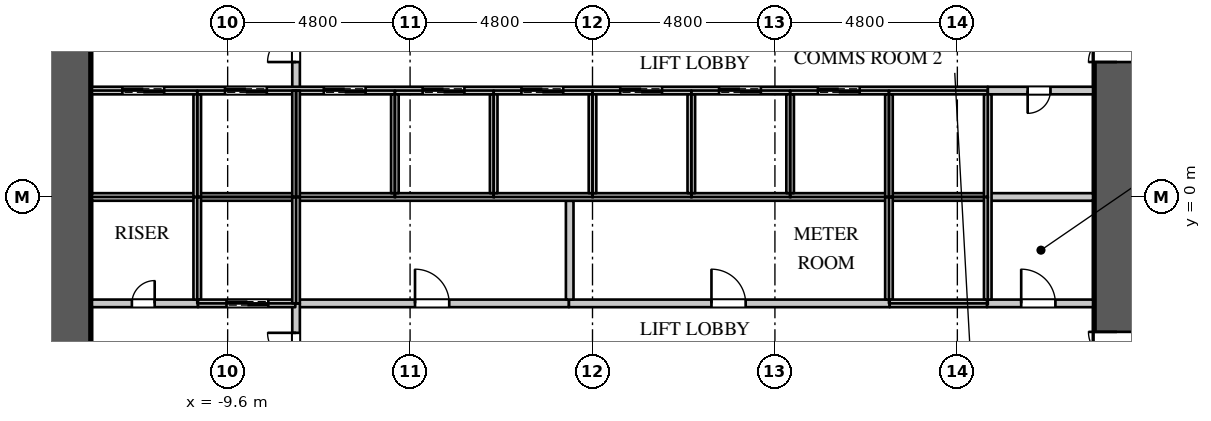
"""IFC4 building model, lengths in metres.
Left out: names, types, materials, properties, quantities, classifications, styles, units other than length and angle.
Written with IfcOpenShell. Run it as: python <this file> out.ifc"""

import sys

from ifc_helpers import new_model, si_unit, direction, frame, frame_2d, origin, place, context, subcontext, project, spatial, rectangle, extrude, element, fill, save


model = new_model("IFC4")
c1 = context("Model", 3, precision=1e-05, world=origin(), true_north=direction((0.0, 1.0)))
c2 = subcontext(c1, "Body", "Model", "MODEL_VIEW")
j1 = project(units=[si_unit("LENGTHUNIT", "METRE"), si_unit("PLANEANGLEUNIT", "RADIAN")], contexts=[c1])
p1 = place(None, origin())
s1 = spatial("IfcSite", under=j1, at=p1, CompositionType="ELEMENT")
p2 = place(p1, origin())
s2 = spatial("IfcBuilding", under=s1, at=p2, CompositionType="ELEMENT")
p3 = place(p2, frame((0.0, 0.0, 11.0)))
s3 = spatial("IfcBuildingStorey", under=s2, at=p3, CompositionType="ELEMENT", Elevation=11.0)
p4 = place(p3, frame((13.8, -10.8, 0.0), z_axis=(0.0, 0.0, 1.0), x_axis=(0.0, 1.0, 0.0)))
e1 = element("IfcWall", 1, at=p4, inside=s3, PredefinedType="SHEAR", context=c2, shape_type="SweptSolid", body=[
    extrude(rectangle(XDim=21.6, YDim=1.2, at=frame_2d((10.8, 0.0))), origin(), (0.0, 0.0, 1.0), 5.0),
])
p5 = place(p4, frame((14.35, 0.0, 0.0)))
e2 = element("IfcOpeningElement", 2, at=p5, cuts=e1, PredefinedType="OPENING", context=c2, shape_type="SweptSolid", body=[
    extrude(rectangle(XDim=1.5, YDim=2.4, at=frame_2d((0.75, 1.2))), frame((0.0, 0.61, 0.0), z_axis=(0.0, -1.0, 0.0), x_axis=(1.0, 0.0, 0.0)), (0.0, 0.0, 1.0), 1.22),
])
p6 = place(p4, frame((5.75, 0.0, 0.0)))
e3 = element("IfcOpeningElement", 3, at=p6, cuts=e1, PredefinedType="OPENING", context=c2, shape_type="SweptSolid", body=[
    extrude(rectangle(XDim=1.5, YDim=2.4, at=frame_2d((0.75, 1.2))), frame((0.0, 0.61, 0.0), z_axis=(0.0, -1.0, 0.0), x_axis=(1.0, 0.0, 0.0)), (0.0, 0.0, 1.0), 1.22),
])
p7 = place(p3, frame((-13.8, -10.8, 0.0), z_axis=(0.0, 0.0, 1.0), x_axis=(0.0, 1.0, 0.0)))
e4 = element("IfcWall", 4, at=p7, inside=s3, PredefinedType="SHEAR", context=c2, shape_type="SweptSolid", body=[
    extrude(rectangle(XDim=21.6, YDim=1.2, at=frame_2d((10.8, 0.0))), origin(), (0.0, 0.0, 1.0), 5.0),
])
p8 = place(p7, frame((15.5, 0.0, 0.0)))
e5 = element("IfcOpeningElement", 5, at=p8, cuts=e4, PredefinedType="OPENING", context=c2, shape_type="SweptSolid", body=[
    extrude(rectangle(XDim=1.5, YDim=2.4, at=frame_2d((0.75, 1.2))), frame((0.0, 0.61, 0.0), z_axis=(0.0, -1.0, 0.0), x_axis=(1.0, 0.0, 0.0)), (0.0, 0.0, 1.0), 1.22),
])
p9 = place(p7, frame((4.5, 0.0, 0.0)))
e6 = element("IfcOpeningElement", 6, at=p9, cuts=e4, PredefinedType="OPENING", context=c2, shape_type="SweptSolid", body=[
    extrude(rectangle(XDim=1.5, YDim=2.4, at=frame_2d((0.75, 1.2))), frame((0.0, 0.61, 0.0), z_axis=(0.0, -1.0, 0.0), x_axis=(1.0, 0.0, 0.0)), (0.0, 0.0, 1.0), 1.22),
])
p10 = place(p3, frame((-7.82, -2.8, 0.0), z_axis=(0.0, 0.0, 1.0), x_axis=(1.0, 0.0, 0.0)))
e7 = element("IfcWall", 7, at=p10, inside=s3, PredefinedType="PARTITIONING", context=c2, shape_type="SweptSolid", body=[
    extrude(rectangle(XDim=7.2, YDim=0.2, at=frame_2d((3.6, 0.0))), origin(), (0.0, 0.0, 1.0), 4.65),
])
p11 = place(p10, frame((3.15, 0.0, 0.0)))
e8 = element("IfcOpeningElement", 8, at=p11, cuts=e7, PredefinedType="OPENING", context=c2, shape_type="SweptSolid", body=[
    extrude(rectangle(XDim=0.9, YDim=2.2, at=frame_2d((0.45, 1.1))), frame((0.0, 0.11, 0.0), z_axis=(0.0, -1.0, 0.0), x_axis=(1.0, 0.0, 0.0)), (0.0, 0.0, 1.0), 0.22),
])
p12 = place(p3, frame((-7.8, -8.075, 0.0), z_axis=(0.0, 0.0, 1.0), x_axis=(0.0, 1.0, 0.0)))
e9 = element("IfcWall", 9, at=p12, inside=s3, PredefinedType="PARTITIONING", context=c2, shape_type="SweptSolid", body=[
    extrude(rectangle(XDim=5.275, YDim=0.2, at=frame_2d((2.637, 0.0))), origin(), (0.0, 0.0, 1.0), 4.65),
])
p13 = place(p12, frame((3.0, 0.0, 0.0)))
e10 = element("IfcOpeningElement", 10, at=p13, cuts=e9, PredefinedType="OPENING", context=c2, shape_type="SweptSolid", body=[
    extrude(rectangle(XDim=1.5, YDim=2.4, at=frame_2d((0.75, 1.2))), frame((0.0, 0.11, 0.0), z_axis=(0.0, -1.0, 0.0), x_axis=(1.0, 0.0, 0.0)), (0.0, 0.0, 1.0), 0.22),
])
p14 = place(p3, frame((-7.8, 2.8, 0.0), z_axis=(0.0, 0.0, 1.0), x_axis=(0.0, 1.0, 0.0)))
e11 = element("IfcWall", 11, at=p14, inside=s3, PredefinedType="PARTITIONING", context=c2, shape_type="SweptSolid", body=[
    extrude(rectangle(XDim=5.275, YDim=0.2, at=frame_2d((2.637, 0.0))), origin(), (0.0, 0.0, 1.0), 4.65),
])
p15 = place(p14, frame((0.75, 0.0, 0.0)))
e12 = element("IfcOpeningElement", 12, at=p15, cuts=e11, PredefinedType="OPENING", context=c2, shape_type="SweptSolid", body=[
    extrude(rectangle(XDim=1.5, YDim=2.4, at=frame_2d((0.75, 1.2))), frame((0.0, 0.11, 0.0), z_axis=(0.0, -1.0, 0.0), x_axis=(1.0, 0.0, 0.0)), (0.0, 0.0, 1.0), 0.22),
])
p16 = place(p3, frame((-13.17, -2.8, 0.0), z_axis=(0.0, 0.0, 1.0), x_axis=(1.0, 0.0, 0.0)))
e13 = element("IfcWall", 13, at=p16, inside=s3, PredefinedType="PARTITIONING", context=c2, shape_type="SweptSolid", body=[
    extrude(rectangle(XDim=2.79, YDim=0.2, at=frame_2d((1.395, 0.0))), origin(), (0.0, 0.0, 1.0), 4.65),
])
p17 = place(p16, frame((1.05, 0.0, 0.0)))
e14 = element("IfcOpeningElement", 14, at=p17, cuts=e13, PredefinedType="OPENING", context=c2, shape_type="SweptSolid", body=[
    extrude(rectangle(XDim=0.6, YDim=2.0, at=frame_2d((0.3, 1.0))), frame((0.0, 0.11, 0.0), z_axis=(0.0, -1.0, 0.0), x_axis=(1.0, 0.0, 0.0)), (0.0, 0.0, 1.0), 0.22),
])
p18 = place(p3, frame((-0.62, -2.8, 0.0), z_axis=(0.0, 0.0, 1.0), x_axis=(1.0, 0.0, 0.0)))
e15 = element("IfcWall", 15, at=p18, inside=s3, PredefinedType="PARTITIONING", context=c2, shape_type="SweptSolid", body=[
    extrude(rectangle(XDim=8.44, YDim=0.2, at=frame_2d((4.22, 0.0))), origin(), (0.0, 0.0, 1.0), 4.65),
])
p19 = place(p18, frame((3.75, 0.0, 0.0)))
e16 = element("IfcOpeningElement", 16, at=p19, cuts=e15, PredefinedType="OPENING", context=c2, shape_type="SweptSolid", body=[
    extrude(rectangle(XDim=0.9, YDim=2.2, at=frame_2d((0.45, 1.1))), frame((0.0, 0.11, 0.0), z_axis=(0.0, -1.0, 0.0), x_axis=(1.0, 0.0, 0.0)), (0.0, 0.0, 1.0), 0.22),
])
p20 = place(p3, frame((-0.6, -2.7, 0.0), z_axis=(0.0, 0.0, 1.0), x_axis=(0.0, 1.0, 0.0)))
e17 = element("IfcWall", 17, at=p20, inside=s3, PredefinedType="PARTITIONING", context=c2, shape_type="SweptSolid", body=[
    extrude(rectangle(XDim=2.6, YDim=0.2, at=frame_2d((1.3, 0.0))), origin(), (0.0, 0.0, 1.0), 4.65),
])
p21 = place(p3, frame((10.38, -2.8, 0.0), z_axis=(0.0, 0.0, 1.0), x_axis=(1.0, 0.0, 0.0)))
e18 = element("IfcWall", 18, at=p21, inside=s3, PredefinedType="PARTITIONING", context=c2, shape_type="SweptSolid", body=[
    extrude(rectangle(XDim=2.79, YDim=0.2, at=frame_2d((1.395, 0.0))), origin(), (0.0, 0.0, 1.0), 4.65),
])
p22 = place(p21, frame((0.9, 0.0, 0.0)))
e19 = element("IfcOpeningElement", 19, at=p22, cuts=e18, PredefinedType="OPENING", context=c2, shape_type="SweptSolid", body=[
    extrude(rectangle(XDim=0.9, YDim=2.2, at=frame_2d((0.45, 1.1))), frame((0.0, 0.11, 0.0), z_axis=(0.0, -1.0, 0.0), x_axis=(1.0, 0.0, 0.0)), (0.0, 0.0, 1.0), 0.22),
])
p23 = place(p3, frame((10.4, 2.8, 0.0), z_axis=(0.0, 0.0, 1.0), x_axis=(1.0, 0.0, 0.0)))
e20 = element("IfcWall", 20, at=p23, inside=s3, PredefinedType="PARTITIONING", context=c2, shape_type="SweptSolid", body=[
    extrude(rectangle(XDim=2.77, YDim=0.2, at=frame_2d((1.385, 0.0))), origin(), (0.0, 0.0, 1.0), 4.65),
])
p24 = place(p23, frame((1.05, 0.0, 0.0)))
e21 = element("IfcOpeningElement", 21, at=p24, cuts=e20, PredefinedType="OPENING", context=c2, shape_type="SweptSolid", body=[
    extrude(rectangle(XDim=0.6, YDim=2.0, at=frame_2d((0.3, 1.0))), frame((0.0, 0.11, 0.0), z_axis=(0.0, -1.0, 0.0), x_axis=(1.0, 0.0, 0.0)), (0.0, 0.0, 1.0), 0.22),
])
p25 = place(p3, frame((10.4, 0.0, 0.0), z_axis=(0.0, 0.0, 1.0), x_axis=(1.0, 0.0, 0.0)))
e22 = element("IfcWall", 22, at=p25, inside=s3, PredefinedType="PARTITIONING", context=c2, shape_type="SweptSolid", body=[
    extrude(rectangle(XDim=2.77, YDim=0.2, at=frame_2d((1.385, 0.0))), origin(), (0.0, 0.0, 1.0), 4.65),
])
p26 = place(p3, frame((-13.17, 0.0, 0.0), z_axis=(0.0, 0.0, 1.0), x_axis=(1.0, 0.0, 0.0)))
e23 = element("IfcWall", 23, at=p26, inside=s3, PredefinedType="PARTITIONING", context=c2, shape_type="SweptSolid", body=[
    extrude(rectangle(XDim=23.57, YDim=0.2, at=frame_2d((11.785, 0.0))), origin(), (0.0, 0.0, 1.0), 4.65),
])
p27 = place(p3, frame((-13.17, 2.8, 0.0), z_axis=(0.0, 0.0, 1.0), x_axis=(1.0, 0.0, 0.0)))
e24 = element("IfcWall", 24, at=p27, inside=s3, PredefinedType="PARTITIONING", context=c2, shape_type="SweptSolid", body=[
    extrude(rectangle(XDim=23.57, YDim=0.2, at=frame_2d((11.785, 0.0))), origin(), (0.0, 0.0, 1.0), 4.65),
])
p28 = place(p27, frame((0.8, 0.0, 0.0)))
e25 = element("IfcOpeningElement", 25, at=p28, cuts=e24, PredefinedType="OPENING", context=c2, shape_type="SweptSolid", body=[
    extrude(rectangle(XDim=1.1, YDim=2.2, at=frame_2d((0.55, 1.1))), frame((0.0, 0.11, 0.0), z_axis=(0.0, -1.0, 0.0), x_axis=(1.0, 0.0, 0.0)), (0.0, 0.0, 1.0), 0.22),
])
p29 = place(p27, frame((3.5, 0.0, 0.0)))
e26 = element("IfcOpeningElement", 26, at=p29, cuts=e24, PredefinedType="OPENING", context=c2, shape_type="SweptSolid", body=[
    extrude(rectangle(XDim=1.1, YDim=2.2, at=frame_2d((0.55, 1.1))), frame((0.0, 0.11, 0.0), z_axis=(0.0, -1.0, 0.0), x_axis=(1.0, 0.0, 0.0)), (0.0, 0.0, 1.0), 0.22),
])
p30 = place(p27, frame((6.1, 0.0, 0.0)))
e27 = element("IfcOpeningElement", 27, at=p30, cuts=e24, PredefinedType="OPENING", context=c2, shape_type="SweptSolid", body=[
    extrude(rectangle(XDim=1.1, YDim=2.2, at=frame_2d((0.55, 1.1))), frame((0.0, 0.11, 0.0), z_axis=(0.0, -1.0, 0.0), x_axis=(1.0, 0.0, 0.0)), (0.0, 0.0, 1.0), 0.22),
])
p31 = place(p27, frame((8.7, 0.0, 0.0)))
e28 = element("IfcOpeningElement", 28, at=p31, cuts=e24, PredefinedType="OPENING", context=c2, shape_type="SweptSolid", body=[
    extrude(rectangle(XDim=1.1, YDim=2.2, at=frame_2d((0.55, 1.1))), frame((0.0, 0.11, 0.0), z_axis=(0.0, -1.0, 0.0), x_axis=(1.0, 0.0, 0.0)), (0.0, 0.0, 1.0), 0.22),
])
p32 = place(p27, frame((11.3, 0.0, 0.0)))
e29 = element("IfcOpeningElement", 29, at=p32, cuts=e24, PredefinedType="OPENING", context=c2, shape_type="SweptSolid", body=[
    extrude(rectangle(XDim=1.1, YDim=2.2, at=frame_2d((0.55, 1.1))), frame((0.0, 0.11, 0.0), z_axis=(0.0, -1.0, 0.0), x_axis=(1.0, 0.0, 0.0)), (0.0, 0.0, 1.0), 0.22),
])
p33 = place(p27, frame((13.9, 0.0, 0.0)))
e30 = element("IfcOpeningElement", 30, at=p33, cuts=e24, PredefinedType="OPENING", context=c2, shape_type="SweptSolid", body=[
    extrude(rectangle(XDim=1.1, YDim=2.2, at=frame_2d((0.55, 1.1))), frame((0.0, 0.11, 0.0), z_axis=(0.0, -1.0, 0.0), x_axis=(1.0, 0.0, 0.0)), (0.0, 0.0, 1.0), 0.22),
])
p34 = place(p27, frame((16.5, 0.0, 0.0)))
e31 = element("IfcOpeningElement", 31, at=p34, cuts=e24, PredefinedType="OPENING", context=c2, shape_type="SweptSolid", body=[
    extrude(rectangle(XDim=1.1, YDim=2.2, at=frame_2d((0.55, 1.1))), frame((0.0, 0.11, 0.0), z_axis=(0.0, -1.0, 0.0), x_axis=(1.0, 0.0, 0.0)), (0.0, 0.0, 1.0), 0.22),
])
p35 = place(p27, frame((19.1, 0.0, 0.0)))
e32 = element("IfcOpeningElement", 32, at=p35, cuts=e24, PredefinedType="OPENING", context=c2, shape_type="SweptSolid", body=[
    extrude(rectangle(XDim=1.1, YDim=2.2, at=frame_2d((0.55, 1.1))), frame((0.0, 0.11, 0.0), z_axis=(0.0, -1.0, 0.0), x_axis=(1.0, 0.0, 0.0)), (0.0, 0.0, 1.0), 0.22),
])
p36 = place(p3, frame((-10.4, -2.7, 0.0), z_axis=(0.0, 0.0, 1.0), x_axis=(0.0, 1.0, 0.0)))
e33 = element("IfcWall", 33, at=p36, inside=s3, PredefinedType="PARTITIONING", context=c2, shape_type="SweptSolid", body=[
    extrude(rectangle(XDim=2.7, YDim=0.2, at=frame_2d((1.35, 0.0))), origin(), (0.0, 0.0, 1.0), 4.65),
])
p37 = place(p3, frame((-10.38, -2.8, 0.0), z_axis=(0.0, 0.0, 1.0), x_axis=(1.0, 0.0, 0.0)))
e34 = element("IfcWall", 34, at=p37, inside=s3, PredefinedType="PARTITIONING", context=c2, shape_type="SweptSolid", body=[
    extrude(rectangle(XDim=2.56, YDim=0.2, at=frame_2d((1.28, 0.0))), origin(), (0.0, 0.0, 1.0), 4.65),
])
p38 = place(p37, frame((0.75, 0.0, 0.0)))
e35 = element("IfcOpeningElement", 35, at=p38, cuts=e34, PredefinedType="OPENING", context=c2, shape_type="SweptSolid", body=[
    extrude(rectangle(XDim=1.1, YDim=2.2, at=frame_2d((0.55, 1.1))), frame((0.0, 0.11, 0.0), z_axis=(0.0, -1.0, 0.0), x_axis=(1.0, 0.0, 0.0)), (0.0, 0.0, 1.0), 0.22),
])
p39 = place(p3, frame((-10.4, 0.0, 0.0), z_axis=(0.0, 0.0, 1.0), x_axis=(0.0, 1.0, 0.0)))
e36 = element("IfcWall", 36, at=p39, inside=s3, PredefinedType="PARTITIONING", context=c2, shape_type="SweptSolid", body=[
    extrude(rectangle(XDim=2.7, YDim=0.2, at=frame_2d((1.35, 0.0))), origin(), (0.0, 0.0, 1.0), 4.65),
])
for number, where, z_axis, x_axis in (
    (37, (-7.8, -2.8, 0.0), (0.0, 0.0, 1.0), (0.0, 1.0, 0.0)),
    (38, (-7.8, 0.0, 0.0), (0.0, 0.0, 1.0), (0.0, 1.0, 0.0)),
):
    element("IfcWall", number, at=place(p3, frame(where, z_axis=z_axis, x_axis=x_axis)), inside=s3, PredefinedType="PARTITIONING", context=c2, shape_type="SweptSolid", body=[
        extrude(rectangle(XDim=2.8, YDim=0.2, at=frame_2d((1.4, 0.0))), origin(), (0.0, 0.0, 1.0), 4.65),
    ])
for number, where, z_axis, x_axis in (
    (39, (-5.2, 0.1, 0.0), (0.0, 0.0, 1.0), (0.0, 1.0, 0.0)),
    (40, (-2.6, 0.1, 0.0), (0.0, 0.0, 1.0), (0.0, 1.0, 0.0)),
    (41, (0.0, 0.1, 0.0), (0.0, 0.0, 1.0), (0.0, 1.0, 0.0)),
    (42, (2.6, 0.1, 0.0), (0.0, 0.0, 1.0), (0.0, 1.0, 0.0)),
    (43, (5.2, 0.1, 0.0), (0.0, 0.0, 1.0), (0.0, 1.0, 0.0)),
):
    element("IfcWall", number, at=place(p3, frame(where, z_axis=z_axis, x_axis=x_axis)), inside=s3, PredefinedType="PARTITIONING", context=c2, shape_type="SweptSolid", body=[
        extrude(rectangle(XDim=2.6, YDim=0.2, at=frame_2d((1.3, 0.0))), origin(), (0.0, 0.0, 1.0), 4.65),
    ])
p40 = place(p3, frame((7.8, -2.7, 0.0), z_axis=(0.0, 0.0, 1.0), x_axis=(0.0, 1.0, 0.0)))
e44 = element("IfcWall", 44, at=p40, inside=s3, PredefinedType="PARTITIONING", context=c2, shape_type="SweptSolid", body=[
    extrude(rectangle(XDim=2.7, YDim=0.2, at=frame_2d((1.35, 0.0))), origin(), (0.0, 0.0, 1.0), 4.65),
])
p41 = place(p3, frame((7.82, -2.8, 0.0), z_axis=(0.0, 0.0, 1.0), x_axis=(1.0, 0.0, 0.0)))
e45 = element("IfcWall", 45, at=p41, inside=s3, PredefinedType="PARTITIONING", context=c2, shape_type="SweptSolid", body=[
    extrude(rectangle(XDim=2.56, YDim=0.2, at=frame_2d((1.28, 0.0))), origin(), (0.0, 0.0, 1.0), 4.65),
])
p42 = place(p3, frame((7.8, 0.0, 0.0), z_axis=(0.0, 0.0, 1.0), x_axis=(0.0, 1.0, 0.0)))
e46 = element("IfcWall", 46, at=p42, inside=s3, PredefinedType="PARTITIONING", context=c2, shape_type="SweptSolid", body=[
    extrude(rectangle(XDim=2.7, YDim=0.2, at=frame_2d((1.35, 0.0))), origin(), (0.0, 0.0, 1.0), 4.65),
])
p43 = place(p3, frame((10.4, -2.7, 0.0), z_axis=(0.0, 0.0, 1.0), x_axis=(0.0, 1.0, 0.0)))
e47 = element("IfcWall", 47, at=p43, inside=s3, PredefinedType="PARTITIONING", context=c2, shape_type="SweptSolid", body=[
    extrude(rectangle(XDim=5.4, YDim=0.2, at=frame_2d((2.7, 0.0))), origin(), (0.0, 0.0, 1.0), 4.65),
])
p44 = place(p24, origin())
e48 = element("IfcDoor", 48, at=p44, inside=s3, OperationType="SINGLE_SWING_RIGHT", PredefinedType="DOOR", context=c2, shape_type="SweptSolid", body=[
    extrude(rectangle(XDim=0.6, YDim=2.0, at=frame_2d((0.3, 1.0))), frame((0.0, 0.025, 0.0), z_axis=(0.0, -1.0, 0.0), x_axis=(1.0, 0.0, 0.0)), (0.0, 0.0, 1.0), 0.05),
])
fill(e21, e48)
p45 = place(p17, origin())
e49 = element("IfcDoor", 49, at=p45, inside=s3, OperationType="SINGLE_SWING_RIGHT", PredefinedType="DOOR", context=c2, shape_type="SweptSolid", body=[
    extrude(rectangle(XDim=0.6, YDim=2.0, at=frame_2d((0.3, 1.0))), frame((0.0, 0.025, 0.0), z_axis=(0.0, -1.0, 0.0), x_axis=(1.0, 0.0, 0.0)), (0.0, 0.0, 1.0), 0.05),
])
fill(e14, e49)
p46 = place(p22, origin())
e50 = element("IfcDoor", 50, at=p46, inside=s3, OperationType="SINGLE_SWING_LEFT", PredefinedType="DOOR", context=c2, shape_type="SweptSolid", body=[
    extrude(rectangle(XDim=0.9, YDim=2.2, at=frame_2d((0.45, 1.1))), frame((0.0, 0.025, 0.0), z_axis=(0.0, -1.0, 0.0), x_axis=(1.0, 0.0, 0.0)), (0.0, 0.0, 1.0), 0.05),
])
fill(e19, e50)
p47 = place(p11, origin())
e51 = element("IfcDoor", 51, at=p47, inside=s3, OperationType="SINGLE_SWING_LEFT", PredefinedType="DOOR", context=c2, shape_type="SweptSolid", body=[
    extrude(rectangle(XDim=0.9, YDim=2.2, at=frame_2d((0.45, 1.1))), frame((0.0, 0.025, 0.0), z_axis=(0.0, -1.0, 0.0), x_axis=(1.0, 0.0, 0.0)), (0.0, 0.0, 1.0), 0.05),
])
fill(e8, e51)
p48 = place(p19, origin())
e52 = element("IfcDoor", 52, at=p48, inside=s3, OperationType="SINGLE_SWING_LEFT", PredefinedType="DOOR", context=c2, shape_type="SweptSolid", body=[
    extrude(rectangle(XDim=0.9, YDim=2.2, at=frame_2d((0.45, 1.1))), frame((0.0, 0.025, 0.0), z_axis=(0.0, -1.0, 0.0), x_axis=(1.0, 0.0, 0.0)), (0.0, 0.0, 1.0), 0.05),
])
fill(e16, e52)
p49 = place(p28, origin())
e53 = element("IfcDoor", 53, at=p49, inside=s3, OperationType="DOUBLE_DOOR_SLIDING", PredefinedType="DOOR", context=c2, shape_type="SweptSolid", body=[
    extrude(rectangle(XDim=1.1, YDim=2.2, at=frame_2d((0.55, 1.1))), frame((0.0, 0.025, 0.0), z_axis=(0.0, -1.0, 0.0), x_axis=(1.0, 0.0, 0.0)), (0.0, 0.0, 1.0), 0.05),
])
fill(e25, e53)
p50 = place(p29, origin())
e54 = element("IfcDoor", 54, at=p50, inside=s3, OperationType="DOUBLE_DOOR_SLIDING", PredefinedType="DOOR", context=c2, shape_type="SweptSolid", body=[
    extrude(rectangle(XDim=1.1, YDim=2.2, at=frame_2d((0.55, 1.1))), frame((0.0, 0.025, 0.0), z_axis=(0.0, -1.0, 0.0), x_axis=(1.0, 0.0, 0.0)), (0.0, 0.0, 1.0), 0.05),
])
fill(e26, e54)
p51 = place(p38, origin())
e55 = element("IfcDoor", 55, at=p51, inside=s3, OperationType="DOUBLE_DOOR_SLIDING", PredefinedType="DOOR", context=c2, shape_type="SweptSolid", body=[
    extrude(rectangle(XDim=1.1, YDim=2.2, at=frame_2d((0.55, 1.1))), frame((0.0, 0.025, 0.0), z_axis=(0.0, -1.0, 0.0), x_axis=(1.0, 0.0, 0.0)), (0.0, 0.0, 1.0), 0.05),
])
fill(e35, e55)
p52 = place(p30, origin())
e56 = element("IfcDoor", 56, at=p52, inside=s3, OperationType="DOUBLE_DOOR_SLIDING", PredefinedType="DOOR", context=c2, shape_type="SweptSolid", body=[
    extrude(rectangle(XDim=1.1, YDim=2.2, at=frame_2d((0.55, 1.1))), frame((0.0, 0.025, 0.0), z_axis=(0.0, -1.0, 0.0), x_axis=(1.0, 0.0, 0.0)), (0.0, 0.0, 1.0), 0.05),
])
fill(e27, e56)
p53 = place(p31, origin())
e57 = element("IfcDoor", 57, at=p53, inside=s3, OperationType="DOUBLE_DOOR_SLIDING", PredefinedType="DOOR", context=c2, shape_type="SweptSolid", body=[
    extrude(rectangle(XDim=1.1, YDim=2.2, at=frame_2d((0.55, 1.1))), frame((0.0, 0.025, 0.0), z_axis=(0.0, -1.0, 0.0), x_axis=(1.0, 0.0, 0.0)), (0.0, 0.0, 1.0), 0.05),
])
fill(e28, e57)
p54 = place(p32, origin())
e58 = element("IfcDoor", 58, at=p54, inside=s3, OperationType="DOUBLE_DOOR_SLIDING", PredefinedType="DOOR", context=c2, shape_type="SweptSolid", body=[
    extrude(rectangle(XDim=1.1, YDim=2.2, at=frame_2d((0.55, 1.1))), frame((0.0, 0.025, 0.0), z_axis=(0.0, -1.0, 0.0), x_axis=(1.0, 0.0, 0.0)), (0.0, 0.0, 1.0), 0.05),
])
fill(e29, e58)
p55 = place(p33, origin())
e59 = element("IfcDoor", 59, at=p55, inside=s3, OperationType="DOUBLE_DOOR_SLIDING", PredefinedType="DOOR", context=c2, shape_type="SweptSolid", body=[
    extrude(rectangle(XDim=1.1, YDim=2.2, at=frame_2d((0.55, 1.1))), frame((0.0, 0.025, 0.0), z_axis=(0.0, -1.0, 0.0), x_axis=(1.0, 0.0, 0.0)), (0.0, 0.0, 1.0), 0.05),
])
fill(e30, e59)
p56 = place(p34, origin())
e60 = element("IfcDoor", 60, at=p56, inside=s3, OperationType="DOUBLE_DOOR_SLIDING", PredefinedType="DOOR", context=c2, shape_type="SweptSolid", body=[
    extrude(rectangle(XDim=1.1, YDim=2.2, at=frame_2d((0.55, 1.1))), frame((0.0, 0.025, 0.0), z_axis=(0.0, -1.0, 0.0), x_axis=(1.0, 0.0, 0.0)), (0.0, 0.0, 1.0), 0.05),
])
fill(e31, e60)
p57 = place(p35, origin())
e61 = element("IfcDoor", 61, at=p57, inside=s3, OperationType="DOUBLE_DOOR_SLIDING", PredefinedType="DOOR", context=c2, shape_type="SweptSolid", body=[
    extrude(rectangle(XDim=1.1, YDim=2.2, at=frame_2d((0.55, 1.1))), frame((0.0, 0.025, 0.0), z_axis=(0.0, -1.0, 0.0), x_axis=(1.0, 0.0, 0.0)), (0.0, 0.0, 1.0), 0.05),
])
fill(e32, e61)
p58 = place(p15, origin())
e62 = element("IfcDoor", 62, at=p58, inside=s3, OperationType="DOUBLE_DOOR_SINGLE_SWING", PredefinedType="DOOR", context=c2, shape_type="SweptSolid", body=[
    extrude(rectangle(XDim=1.5, YDim=2.4, at=frame_2d((0.75, 1.2))), frame((0.0, 0.025, 0.0), z_axis=(0.0, -1.0, 0.0), x_axis=(1.0, 0.0, 0.0)), (0.0, 0.0, 1.0), 0.05),
])
fill(e12, e62)
p59 = place(p13, origin())
e63 = element("IfcDoor", 63, at=p59, inside=s3, OperationType="DOUBLE_DOOR_SINGLE_SWING", PredefinedType="DOOR", context=c2, shape_type="SweptSolid", body=[
    extrude(rectangle(XDim=1.5, YDim=2.4, at=frame_2d((0.75, 1.2))), frame((0.0, 0.025, 0.0), z_axis=(0.0, -1.0, 0.0), x_axis=(1.0, 0.0, 0.0)), (0.0, 0.0, 1.0), 0.05),
])
fill(e10, e63)
p60 = place(p5, origin())
e64 = element("IfcDoor", 64, at=p60, inside=s3, OperationType="DOUBLE_DOOR_SINGLE_SWING", PredefinedType="DOOR", context=c2, shape_type="SweptSolid", body=[
    extrude(rectangle(XDim=1.5, YDim=2.4, at=frame_2d((0.75, 1.2))), frame((0.0, 0.025, 0.0), z_axis=(0.0, -1.0, 0.0), x_axis=(1.0, 0.0, 0.0)), (0.0, 0.0, 1.0), 0.05),
])
fill(e2, e64)
p61 = place(p6, origin())
e65 = element("IfcDoor", 65, at=p61, inside=s3, OperationType="DOUBLE_DOOR_SINGLE_SWING", PredefinedType="DOOR", context=c2, shape_type="SweptSolid", body=[
    extrude(rectangle(XDim=1.5, YDim=2.4, at=frame_2d((0.75, 1.2))), frame((0.0, 0.025, 0.0), z_axis=(0.0, -1.0, 0.0), x_axis=(1.0, 0.0, 0.0)), (0.0, 0.0, 1.0), 0.05),
])
fill(e3, e65)
save(model, sys.argv[1])
